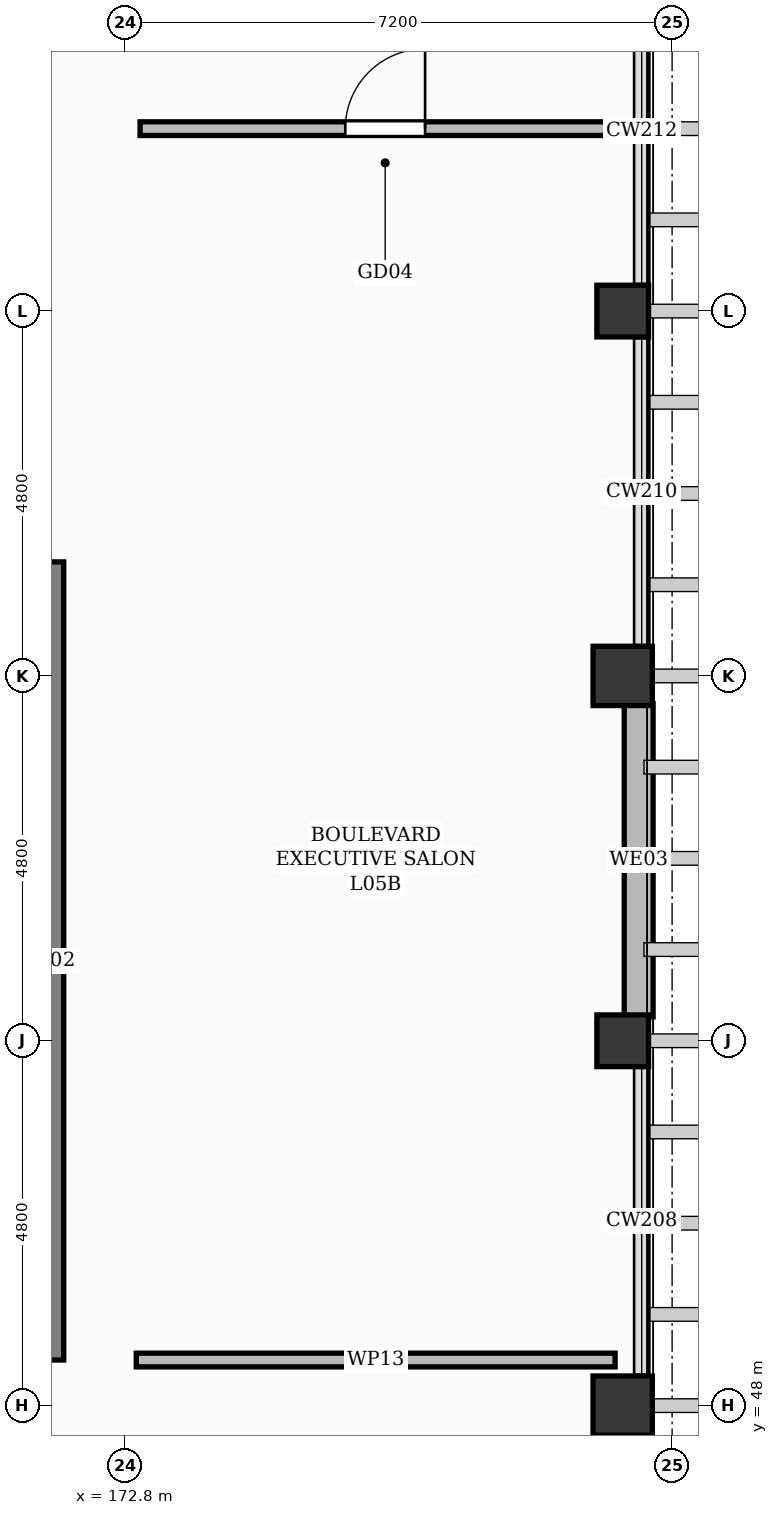
"""IFC4 building model, lengths in metres.
Left out: names, types, materials, properties, quantities, classifications, styles, units other than length and angle.
Written with IfcOpenShell. Run it as: python <this file> out.ifc"""

import sys

from ifc_helpers import new_model, si_unit, direction, frame, frame_2d, origin, origin_2d, place, context, subcontext, project, spatial, rectangle, extrude, element, fill, save


model = new_model("IFC4")
c1 = context("Model", 3, precision=1e-05, world=origin(), true_north=direction((0.0, 1.0)))
c2 = subcontext(c1, "Body", "Model", "MODEL_VIEW")
j1 = project(units=[si_unit("LENGTHUNIT", "METRE"), si_unit("PLANEANGLEUNIT", "RADIAN")], contexts=[c1])
p1 = place(None, origin())
s1 = spatial("IfcSite", under=j1, at=p1, CompositionType="ELEMENT")
p2 = place(p1, origin())
s2 = spatial("IfcBuilding", under=s1, at=p2, CompositionType="ELEMENT")
p3 = place(p2, frame((0.0, 0.0, 24.6)))
s3 = spatial("IfcBuildingStorey", under=s2, at=p3, CompositionType="ELEMENT", Elevation=24.6)
for number, where, z_axis, x_axis in (
    (1, (179.35, 48.0, 0.0), (0.0, 0.0, 1.0), (1.0, 0.0, 0.0)),
    (2, (179.35, 57.6, 0.0), (0.0, 0.0, 1.0), (1.0, 0.0, 0.0)),
):
    element("IfcColumn", number, at=place(p3, frame(where, z_axis=z_axis, x_axis=x_axis)), inside=s3, PredefinedType="COLUMN", context=c2, shape_type="SweptSolid", body=[
        extrude(rectangle(XDim=0.78, YDim=0.78, at=origin_2d()), origin(), (0.0, 0.0, 1.0), 3.6),
    ])
for number, where, z_axis, x_axis in (
    (3, (179.35, 52.8, 0.0), (0.0, 0.0, 1.0), (1.0, 0.0, 0.0)),
    (4, (179.35, 62.4, 0.0), (0.0, 0.0, 1.0), (1.0, 0.0, 0.0)),
):
    element("IfcColumn", number, at=place(p3, frame(where, z_axis=z_axis, x_axis=x_axis)), inside=s3, PredefinedType="COLUMN", context=c2, shape_type="SweptSolid", body=[
        extrude(rectangle(XDim=0.68, YDim=0.68, at=origin_2d()), origin(), (0.0, 0.0, 1.0), 3.6),
    ])
p4 = place(p3, frame((179.56, 57.235, 0.0), z_axis=(0.0, 0.0, 1.0), x_axis=(0.0, -1.0, 0.0)))
e5 = element("IfcWall", 5, at=p4, inside=s3, PredefinedType="SOLIDWALL", context=c2, shape_type="SweptSolid", body=[
    extrude(rectangle(XDim=4.12, YDim=0.38, at=frame_2d((2.06, 0.0))), origin(), (0.0, 0.0, 1.0), 2.582),
])
p5 = place(p3, frame((171.77, 48.6, 0.0), z_axis=(0.0, 0.0, 1.0), x_axis=(0.0, 1.0, 0.0)))
e6 = element("IfcWall", 6, at=p5, inside=s3, PredefinedType="SHEAR", context=c2, shape_type="SweptSolid", body=[
    extrude(rectangle(XDim=10.5, YDim=0.45, at=frame_2d((5.25, 0.0))), origin(), (0.0, 0.0, 1.0), 3.34),
])
p6 = place(p3, frame((172.95, 48.6, 0.0), z_axis=(0.0, 0.0, 1.0), x_axis=(1.0, 0.0, 0.0)))
e7 = element("IfcWall", 7, at=p6, inside=s3, PredefinedType="PARTITIONING", context=c2, shape_type="SweptSolid", body=[
    extrude(rectangle(XDim=6.3, YDim=0.18, at=frame_2d((3.15, 0.0))), origin(), (0.0, 0.0, 1.0), 2.582),
])
p7 = place(p3, frame((173.0, 64.8, 0.0), z_axis=(0.0, 0.0, 1.0), x_axis=(1.0, 0.0, 0.0)))
e8 = element("IfcWall", 8, at=p7, inside=s3, PredefinedType="PARTITIONING", context=c2, shape_type="SweptSolid", body=[
    extrude(rectangle(XDim=6.2, YDim=0.18, at=frame_2d((3.1, 0.0))), origin(), (0.0, 0.0, 1.0), 2.582),
])
p8 = place(p7, frame((2.7, 0.0, 0.0)))
e9 = element("IfcOpeningElement", 9, at=p8, cuts=e8, PredefinedType="OPENING", context=c2, shape_type="SweptSolid", body=[
    extrude(rectangle(XDim=1.05, YDim=2.22, at=frame_2d((0.525, 1.11))), frame((0.0, 0.102, 0.0), z_axis=(0.0, -1.0, 0.0), x_axis=(1.0, 0.0, 0.0)), (0.0, 0.0, 1.0), 0.204),
])
p9 = place(p8, origin())
e10 = element("IfcDoor", 10, at=p9, inside=s3, OperationType="SINGLE_SWING_RIGHT", PredefinedType="DOOR", context=c2, shape_type="SweptSolid", body=[
    extrude(rectangle(XDim=1.05, YDim=2.22, at=frame_2d((0.525, 1.11))), frame((0.0, 0.025, 0.0), z_axis=(0.0, -1.0, 0.0), x_axis=(1.0, 0.0, 0.0)), (0.0, 0.0, 1.0), 0.05),
])
fill(e9, e10)
save(model, sys.argv[1])
